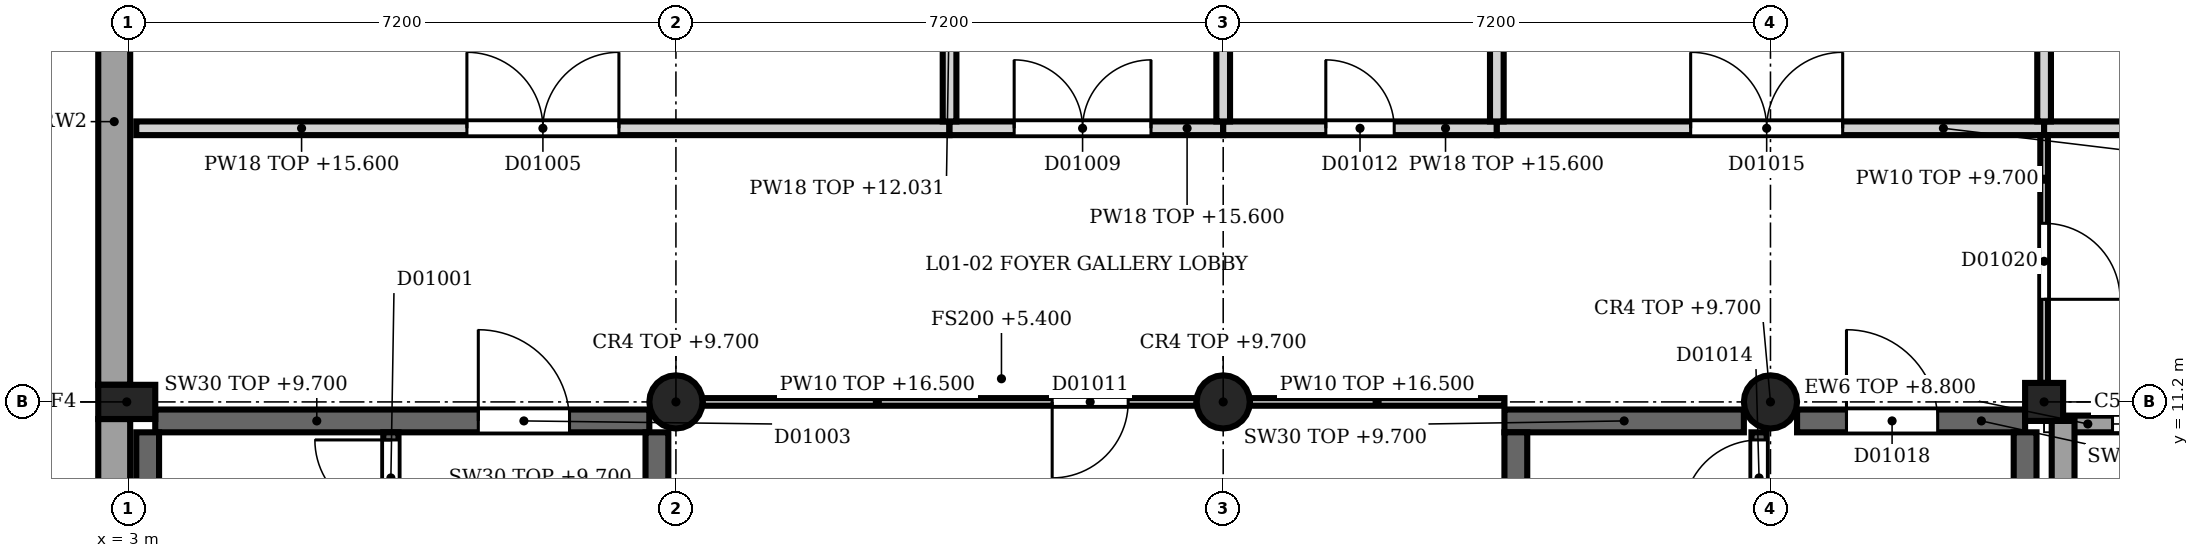
"""IFC4 building model, lengths in metres.
Left out: names, types, materials, properties, quantities, classifications, styles, units other than length and angle.
Written with IfcOpenShell. Run it as: python <this file> out.ifc"""

import sys

from ifc_helpers import new_model, si_unit, direction, frame, frame_2d, origin, origin_2d, place, context, subcontext, project, spatial, rectangle, circle, extrude, element, fill, save


model = new_model("IFC4")
c1 = context("Model", 3, precision=1e-05, world=origin(), true_north=direction((0.0, 1.0)))
c2 = subcontext(c1, "Body", "Model", "MODEL_VIEW")
j1 = project(units=[si_unit("LENGTHUNIT", "METRE"), si_unit("PLANEANGLEUNIT", "RADIAN")], contexts=[c1])
p1 = place(None, origin())
s1 = spatial("IfcSite", under=j1, at=p1, CompositionType="ELEMENT")
p2 = place(p1, origin())
s2 = spatial("IfcBuilding", under=s1, at=p2, CompositionType="ELEMENT")
p3 = place(p2, frame((0.0, 0.0, 5.4)))
s3 = spatial("IfcBuildingStorey", under=s2, at=p3, CompositionType="ELEMENT", Elevation=5.4)
p4 = place(p3, frame((28.2, 11.2, 0.0), z_axis=(0.0, 0.0, 1.0), x_axis=(1.0, 0.0, 0.0)))
e1 = element("IfcColumn", 1, at=p4, inside=s3, PredefinedType="COLUMN", context=c2, shape_type="SweptSolid", body=[
    extrude(rectangle(XDim=0.5, YDim=0.5, at=origin_2d()), origin(), (0.0, 0.0, 1.0), 4.5),
])
p5 = place(p3, frame((2.975, 11.2, 0.0), z_axis=(0.0, 0.0, 1.0), x_axis=(1.0, 0.0, 0.0)))
e2 = element("IfcColumn", 2, at=p5, inside=s3, PredefinedType="COLUMN", context=c2, shape_type="SweptSolid", body=[
    extrude(rectangle(XDim=0.75, YDim=0.45, at=origin_2d()), origin(), (0.0, 0.0, 1.0), 4.5),
])
for number, where, z_axis, x_axis in (
    (3, (10.2, 11.2, 0.0), (0.0, 0.0, 1.0), (1.0, 0.0, 0.0)),
    (4, (17.4, 11.2, 0.0), (0.0, 0.0, 1.0), (1.0, 0.0, 0.0)),
    (5, (24.6, 11.2, 0.0), (0.0, 0.0, 1.0), (1.0, 0.0, 0.0)),
):
    element("IfcColumn", number, at=place(p3, frame(where, z_axis=z_axis, x_axis=x_axis)), inside=s3, PredefinedType="COLUMN", context=c2, shape_type="SweptSolid", body=[
        extrude(circle(Radius=0.35, at=origin_2d()), origin(), (0.0, 0.0, 1.0), 4.3),
    ])
p6 = place(p3, frame((28.45, 10.95, 0.0), z_axis=(0.0, 0.0, 1.0), x_axis=(0.0, -1.0, 0.0)))
e6 = element("IfcWall", 6, at=p6, inside=s3, PredefinedType="SOLIDWALL", context=c2, shape_type="SweptSolid", body=[
    extrude(rectangle(XDim=6.95, YDim=0.3, at=frame_2d((3.475, 0.0))), origin(), (0.0, 0.0, 1.0), 4.5),
])
p7 = place(p3, frame((2.81, 4.0, 0.0), z_axis=(0.0, 0.0, 1.0), x_axis=(0.0, 1.0, 0.0)))
e7 = element("IfcWall", 7, at=p7, inside=s3, PredefinedType="SOLIDWALL", context=c2, shape_type="SweptSolid", body=[
    extrude(rectangle(XDim=6.975, YDim=0.42, at=frame_2d((3.488, 0.0))), origin(), (0.0, 0.0, 1.0), 4.5),
])
p8 = place(p3, frame((2.81, 11.425, 0.0), z_axis=(0.0, 0.0, 1.0), x_axis=(0.0, 1.0, 0.0)))
e8 = element("IfcWall", 8, at=p8, inside=s3, PredefinedType="SOLIDWALL", context=c2, shape_type="SweptSolid", body=[
    extrude(rectangle(XDim=6.925, YDim=0.42, at=frame_2d((3.462, 0.0))), origin(), (0.0, 0.0, 1.0), 4.5),
])
p9 = place(p3, frame((31.55, 10.91, 0.0), z_axis=(0.0, 0.0, 1.0), x_axis=(-1.0, 0.0, 0.0)))
e9 = element("IfcWall", 9, at=p9, inside=s3, PredefinedType="SOLIDWALL", context=c2, shape_type="SweptSolid", body=[
    extrude(rectangle(XDim=3.1, YDim=0.22, at=frame_2d((1.55, 0.0))), origin(), (0.0, 0.0, 1.0), 3.4),
])
p10 = place(p9, frame((0.65, 0.0, 0.9)))
e10 = element("IfcOpeningElement", 10, at=p10, cuts=e9, PredefinedType="OPENING", context=c2, shape_type="SweptSolid", body=[
    extrude(rectangle(XDim=1.8, YDim=2.4, at=frame_2d((0.9, 1.2))), frame((0.0, 0.12, 0.0), z_axis=(0.0, -1.0, 0.0), x_axis=(1.0, 0.0, 0.0)), (0.0, 0.0, 1.0), 0.24),
])
p11 = place(p3, frame((9.85, 10.95, 0.0), z_axis=(0.0, 0.0, 1.0), x_axis=(-1.0, 0.0, 0.0)))
e11 = element("IfcWall", 11, at=p11, inside=s3, PredefinedType="SHEAR", context=c2, shape_type="SweptSolid", body=[
    extrude(rectangle(XDim=6.5, YDim=0.3, at=frame_2d((3.25, 0.0))), origin(), (0.0, 0.0, 1.0), 4.3),
])
p12 = place(p11, frame((1.05, 0.0, 0.0)))
e12 = element("IfcOpeningElement", 12, at=p12, cuts=e11, PredefinedType="OPENING", context=c2, shape_type="SweptSolid", body=[
    extrude(rectangle(XDim=1.2, YDim=2.1, at=frame_2d((0.6, 1.05))), frame((0.0, 0.16, 0.0), z_axis=(0.0, -1.0, 0.0), x_axis=(1.0, 0.0, 0.0)), (0.0, 0.0, 1.0), 0.32),
])
for number, where, z_axis, x_axis in (
    (13, (3.25, 4.4, 0.0), (0.0, 0.0, 1.0), (0.0, 1.0, 0.0)),
    (14, (9.95, 4.4, 0.0), (0.0, 0.0, 1.0), (0.0, 1.0, 0.0)),
):
    element("IfcWall", number, at=place(p3, frame(where, z_axis=z_axis, x_axis=x_axis)), inside=s3, PredefinedType="SHEAR", context=c2, shape_type="SweptSolid", body=[
        extrude(rectangle(XDim=6.4, YDim=0.3, at=frame_2d((3.2, 0.0))), origin(), (0.0, 0.0, 1.0), 4.3),
    ])
p13 = place(p3, frame((6.45, 4.4, 0.0), z_axis=(0.0, 0.0, 1.0), x_axis=(0.0, 1.0, 0.0)))
e15 = element("IfcWall", 15, at=p13, inside=s3, PredefinedType="SHEAR", context=c2, shape_type="SweptSolid", body=[
    extrude(rectangle(XDim=6.4, YDim=0.2, at=frame_2d((3.2, 0.0))), origin(), (0.0, 0.0, 1.0), 4.3),
])
p14 = place(p13, frame((5.3, 0.0, 0.0)))
e16 = element("IfcOpeningElement", 16, at=p14, cuts=e15, PredefinedType="OPENING", context=c2, shape_type="SweptSolid", body=[
    extrude(rectangle(XDim=1.0, YDim=2.1, at=frame_2d((0.5, 1.05))), frame((0.0, 0.11, 0.0), z_axis=(0.0, -1.0, 0.0), x_axis=(1.0, 0.0, 0.0)), (0.0, 0.0, 1.0), 0.22),
])
p15 = place(p3, frame((24.25, 10.95, 0.0), z_axis=(0.0, 0.0, 1.0), x_axis=(-1.0, 0.0, 0.0)))
e17 = element("IfcWall", 17, at=p15, inside=s3, PredefinedType="SHEAR", context=c2, shape_type="SweptSolid", body=[
    extrude(rectangle(XDim=3.15, YDim=0.3, at=frame_2d((1.575, 0.0))), origin(), (0.0, 0.0, 1.0), 4.3),
])
p16 = place(p3, frame((27.95, 10.95, 0.0), z_axis=(0.0, 0.0, 1.0), x_axis=(-1.0, 0.0, 0.0)))
e18 = element("IfcWall", 18, at=p16, inside=s3, PredefinedType="SHEAR", context=c2, shape_type="SweptSolid", body=[
    extrude(rectangle(XDim=3.0, YDim=0.3, at=frame_2d((1.5, 0.0))), origin(), (0.0, 0.0, 1.0), 4.3),
])
p17 = place(p16, frame((1.15, 0.0, 0.0)))
e19 = element("IfcOpeningElement", 19, at=p17, cuts=e18, PredefinedType="OPENING", context=c2, shape_type="SweptSolid", body=[
    extrude(rectangle(XDim=1.2, YDim=2.1, at=frame_2d((0.6, 1.05))), frame((0.0, 0.16, 0.0), z_axis=(0.0, -1.0, 0.0), x_axis=(1.0, 0.0, 0.0)), (0.0, 0.0, 1.0), 0.32),
])
for number, where, z_axis, x_axis in (
    (20, (21.25, 4.4, 0.0), (0.0, 0.0, 1.0), (0.0, 1.0, 0.0)),
    (21, (27.95, 4.4, 0.0), (0.0, 0.0, 1.0), (0.0, 1.0, 0.0)),
):
    element("IfcWall", number, at=place(p3, frame(where, z_axis=z_axis, x_axis=x_axis)), inside=s3, PredefinedType="SHEAR", context=c2, shape_type="SweptSolid", body=[
        extrude(rectangle(XDim=6.4, YDim=0.3, at=frame_2d((3.2, 0.0))), origin(), (0.0, 0.0, 1.0), 4.3),
    ])
p18 = place(p3, frame((24.45, 4.4, 0.0), z_axis=(0.0, 0.0, 1.0), x_axis=(0.0, 1.0, 0.0)))
e22 = element("IfcWall", 22, at=p18, inside=s3, PredefinedType="SHEAR", context=c2, shape_type="SweptSolid", body=[
    extrude(rectangle(XDim=6.4, YDim=0.2, at=frame_2d((3.2, 0.0))), origin(), (0.0, 0.0, 1.0), 4.3),
])
p19 = place(p18, frame((5.3, 0.0, 0.0)))
e23 = element("IfcOpeningElement", 23, at=p19, cuts=e22, PredefinedType="OPENING", context=c2, shape_type="SweptSolid", body=[
    extrude(rectangle(XDim=1.0, YDim=2.1, at=frame_2d((0.5, 1.05))), frame((0.0, 0.11, 0.0), z_axis=(0.0, -1.0, 0.0), x_axis=(1.0, 0.0, 0.0)), (0.0, 0.0, 1.0), 0.22),
])
p20 = place(p3, frame((17.05, 11.2, 0.0), z_axis=(0.0, 0.0, 1.0), x_axis=(-1.0, 0.0, 0.0)))
e24 = element("IfcWall", 24, at=p20, inside=s3, PredefinedType="PARTITIONING", context=c2, shape_type="SweptSolid", body=[
    extrude(rectangle(XDim=6.5, YDim=0.1, at=frame_2d((3.25, 0.0))), origin(), (0.0, 0.0, 1.0), 11.1),
])
p21 = place(p20, frame((0.9, 0.0, 0.0)))
e25 = element("IfcOpeningElement", 25, at=p21, cuts=e24, PredefinedType="OPENING", context=c2, shape_type="SweptSolid", body=[
    extrude(rectangle(XDim=1.0, YDim=2.1, at=frame_2d((0.5, 1.05))), frame((0.0, 0.06, 0.0), z_axis=(0.0, -1.0, 0.0), x_axis=(1.0, 0.0, 0.0)), (0.0, 0.0, 1.0), 0.12),
])
p22 = place(p3, frame((17.75, 11.2, 0.0), z_axis=(0.0, 0.0, 1.0), x_axis=(1.0, 0.0, 0.0)))
e26 = element("IfcWall", 26, at=p22, inside=s3, PredefinedType="PARTITIONING", context=c2, shape_type="SweptSolid", body=[
    extrude(rectangle(XDim=3.35, YDim=0.1, at=frame_2d((1.675, 0.0))), origin(), (0.0, 0.0, 1.0), 11.1),
])
p23 = place(p3, frame((13.8, 14.8, 0.0), z_axis=(0.0, 0.0, 1.0), x_axis=(-1.0, 0.0, 0.0)))
e27 = element("IfcWall", 27, at=p23, inside=s3, PredefinedType="PARTITIONING", context=c2, shape_type="SweptSolid", body=[
    extrude(rectangle(XDim=10.7, YDim=0.18, at=frame_2d((5.35, 0.0))), origin(), (0.0, 0.0, 1.0), 10.2),
])
p24 = place(p23, frame((4.35, 0.0, 0.0)))
e28 = element("IfcOpeningElement", 28, at=p24, cuts=e27, PredefinedType="OPENING", context=c2, shape_type="SweptSolid", body=[
    extrude(rectangle(XDim=2.0, YDim=2.3, at=frame_2d((1.0, 1.15))), frame((0.0, 0.1, 0.0), z_axis=(0.0, -1.0, 0.0), x_axis=(1.0, 0.0, 0.0)), (0.0, 0.0, 1.0), 0.2),
])
p25 = place(p3, frame((13.8, 14.8, 0.0), z_axis=(0.0, 0.0, 1.0), x_axis=(1.0, 0.0, 0.0)))
e29 = element("IfcWall", 29, at=p25, inside=s3, PredefinedType="PARTITIONING", context=c2, shape_type="SweptSolid", body=[
    extrude(rectangle(XDim=3.6, YDim=0.18, at=frame_2d((1.8, 0.0))), origin(), (0.0, 0.0, 1.0), 10.2),
])
p26 = place(p25, frame((0.85, 0.0, 0.0)))
e30 = element("IfcOpeningElement", 30, at=p26, cuts=e29, PredefinedType="OPENING", context=c2, shape_type="SweptSolid", body=[
    extrude(rectangle(XDim=1.8, YDim=2.2, at=frame_2d((0.9, 1.1))), frame((0.0, 0.1, 0.0), z_axis=(0.0, -1.0, 0.0), x_axis=(1.0, 0.0, 0.0)), (0.0, 0.0, 1.0), 0.2),
])
p27 = place(p3, frame((17.4, 14.8, 0.0), z_axis=(0.0, 0.0, 1.0), x_axis=(1.0, 0.0, 0.0)))
e31 = element("IfcWall", 31, at=p27, inside=s3, PredefinedType="PARTITIONING", context=c2, shape_type="SweptSolid", body=[
    extrude(rectangle(XDim=3.6, YDim=0.18, at=frame_2d((1.8, 0.0))), origin(), (0.0, 0.0, 1.0), 10.2),
])
p28 = place(p27, frame((1.35, 0.0, 0.0)))
e32 = element("IfcOpeningElement", 32, at=p28, cuts=e31, PredefinedType="OPENING", context=c2, shape_type="SweptSolid", body=[
    extrude(rectangle(XDim=0.9, YDim=2.2, at=frame_2d((0.45, 1.1))), frame((0.0, 0.1, 0.0), z_axis=(0.0, -1.0, 0.0), x_axis=(1.0, 0.0, 0.0)), (0.0, 0.0, 1.0), 0.2),
])
p29 = place(p3, frame((28.2, 14.8, 0.0), z_axis=(0.0, 0.0, 1.0), x_axis=(-1.0, 0.0, 0.0)))
e33 = element("IfcWall", 33, at=p29, inside=s3, PredefinedType="PARTITIONING", context=c2, shape_type="SweptSolid", body=[
    extrude(rectangle(XDim=7.2, YDim=0.18, at=frame_2d((3.6, 0.0))), origin(), (0.0, 0.0, 1.0), 10.2),
])
p30 = place(p29, frame((2.65, 0.0, 0.0)))
e34 = element("IfcOpeningElement", 34, at=p30, cuts=e33, PredefinedType="OPENING", context=c2, shape_type="SweptSolid", body=[
    extrude(rectangle(XDim=2.0, YDim=2.3, at=frame_2d((1.0, 1.15))), frame((0.0, 0.1, 0.0), z_axis=(0.0, -1.0, 0.0), x_axis=(1.0, 0.0, 0.0)), (0.0, 0.0, 1.0), 0.2),
])
p31 = place(p3, frame((28.2, 14.8, 0.0), z_axis=(0.0, 0.0, 1.0), x_axis=(1.0, 0.0, 0.0)))
e35 = element("IfcWall", 35, at=p31, inside=s3, PredefinedType="PARTITIONING", context=c2, shape_type="SweptSolid", body=[
    extrude(rectangle(XDim=7.2, YDim=0.18, at=frame_2d((3.6, 0.0))), origin(), (0.0, 0.0, 1.0), 4.3),
])
p32 = place(p3, frame((13.8, 14.89, 0.0), z_axis=(0.0, 0.0, 1.0), x_axis=(0.0, 1.0, 0.0)))
e36 = element("IfcWall", 36, at=p32, inside=s3, PredefinedType="PARTITIONING", context=c2, shape_type="SweptSolid", body=[
    extrude(rectangle(XDim=3.41, YDim=0.18, at=frame_2d((1.705, 0.0))), origin(), (0.0, 0.0, 1.0), 6.631),
])
p33 = place(p3, frame((17.4, 14.89, 0.0), z_axis=(0.0, 0.0, 1.0), x_axis=(0.0, 1.0, 0.0)))
e37 = element("IfcWall", 37, at=p33, inside=s3, PredefinedType="PARTITIONING", context=c2, shape_type="SweptSolid", body=[
    extrude(rectangle(XDim=3.16, YDim=0.18, at=frame_2d((1.58, 0.0))), origin(), (0.0, 0.0, 1.0), 4.426),
])
p34 = place(p3, frame((21.0, 14.89, 0.0), z_axis=(0.0, 0.0, 1.0), x_axis=(0.0, 1.0, 0.0)))
e38 = element("IfcWall", 38, at=p34, inside=s3, PredefinedType="PARTITIONING", context=c2, shape_type="SweptSolid", body=[
    extrude(rectangle(XDim=3.41, YDim=0.18, at=frame_2d((1.705, 0.0))), origin(), (0.0, 0.0, 1.0), 6.631),
])
p35 = place(p3, frame((28.2, 14.71, 0.0), z_axis=(0.0, 0.0, 1.0), x_axis=(0.0, -1.0, 0.0)))
e39 = element("IfcWall", 39, at=p35, inside=s3, PredefinedType="PARTITIONING", context=c2, shape_type="SweptSolid", body=[
    extrude(rectangle(XDim=3.26, YDim=0.1, at=frame_2d((1.63, 0.0))), origin(), (0.0, 0.0, 1.0), 4.3),
])
p36 = place(p35, frame((1.16, 0.0, 0.0)))
e40 = element("IfcOpeningElement", 40, at=p36, cuts=e39, PredefinedType="OPENING", context=c2, shape_type="SweptSolid", body=[
    extrude(rectangle(XDim=1.0, YDim=2.1, at=frame_2d((0.5, 1.05))), frame((0.0, 0.06, 0.0), z_axis=(0.0, -1.0, 0.0), x_axis=(1.0, 0.0, 0.0)), (0.0, 0.0, 1.0), 0.12),
])
p37 = place(p3, frame((28.2, 14.89, 0.0), z_axis=(0.0, 0.0, 1.0), x_axis=(0.0, 1.0, 0.0)))
e41 = element("IfcWall", 41, at=p37, inside=s3, PredefinedType="PARTITIONING", context=c2, shape_type="SweptSolid", body=[
    extrude(rectangle(XDim=3.26, YDim=0.18, at=frame_2d((1.63, 0.0))), origin(), (0.0, 0.0, 1.0), 4.3),
])
p38 = place(p10, origin())
e42 = element("IfcWindow", 42, at=p38, inside=s3, PartitioningType="SINGLE_PANEL", PredefinedType="WINDOW", context=c2, shape_type="SweptSolid", body=[
    extrude(rectangle(XDim=1.8, YDim=2.4, at=frame_2d((0.9, 1.2))), frame((0.0, 0.03, 0.0), z_axis=(0.0, -1.0, 0.0), x_axis=(1.0, 0.0, 0.0)), (0.0, 0.0, 1.0), 0.06),
])
fill(e10, e42)
p39 = place(p12, origin())
e43 = element("IfcDoor", 43, at=p39, inside=s3, OperationType="SINGLE_SWING_LEFT", PredefinedType="DOOR", context=c2, shape_type="SweptSolid", body=[
    extrude(rectangle(XDim=1.2, YDim=2.1, at=frame_2d((0.6, 1.05))), frame((0.0, 0.025, 0.0), z_axis=(0.0, -1.0, 0.0), x_axis=(1.0, 0.0, 0.0)), (0.0, 0.0, 1.0), 0.05),
])
fill(e12, e43)
p40 = place(p14, origin())
e44 = element("IfcDoor", 44, at=p40, inside=s3, OperationType="SINGLE_SWING_RIGHT", PredefinedType="DOOR", context=c2, shape_type="SweptSolid", body=[
    extrude(rectangle(XDim=1.0, YDim=2.1, at=frame_2d((0.5, 1.05))), frame((0.0, 0.025, 0.0), z_axis=(0.0, -1.0, 0.0), x_axis=(1.0, 0.0, 0.0)), (0.0, 0.0, 1.0), 0.05),
])
fill(e16, e44)
p41 = place(p17, origin())
e45 = element("IfcDoor", 45, at=p41, inside=s3, OperationType="SINGLE_SWING_RIGHT", PredefinedType="DOOR", context=c2, shape_type="SweptSolid", body=[
    extrude(rectangle(XDim=1.2, YDim=2.1, at=frame_2d((0.6, 1.05))), frame((0.0, 0.025, 0.0), z_axis=(0.0, -1.0, 0.0), x_axis=(1.0, 0.0, 0.0)), (0.0, 0.0, 1.0), 0.05),
])
fill(e19, e45)
p42 = place(p19, origin())
e46 = element("IfcDoor", 46, at=p42, inside=s3, OperationType="SINGLE_SWING_RIGHT", PredefinedType="DOOR", context=c2, shape_type="SweptSolid", body=[
    extrude(rectangle(XDim=1.0, YDim=2.1, at=frame_2d((0.5, 1.05))), frame((0.0, 0.025, 0.0), z_axis=(0.0, -1.0, 0.0), x_axis=(1.0, 0.0, 0.0)), (0.0, 0.0, 1.0), 0.05),
])
fill(e23, e46)
p43 = place(p21, origin())
e47 = element("IfcDoor", 47, at=p43, inside=s3, OperationType="SINGLE_SWING_LEFT", PredefinedType="DOOR", context=c2, shape_type="SweptSolid", body=[
    extrude(rectangle(XDim=1.0, YDim=2.1, at=frame_2d((0.5, 1.05))), frame((0.0, 0.025, 0.0), z_axis=(0.0, -1.0, 0.0), x_axis=(1.0, 0.0, 0.0)), (0.0, 0.0, 1.0), 0.05),
])
fill(e25, e47)
p44 = place(p24, origin())
e48 = element("IfcDoor", 48, at=p44, inside=s3, OperationType="SINGLE_SWING_LEFT", PredefinedType="DOOR", context=c2, shape_type="SweptSolid", body=[
    extrude(rectangle(XDim=2.0, YDim=2.3, at=frame_2d((1.0, 1.15))), frame((0.0, 0.025, 0.0), z_axis=(0.0, -1.0, 0.0), x_axis=(1.0, 0.0, 0.0)), (0.0, 0.0, 1.0), 0.05),
])
fill(e28, e48)
p45 = place(p26, origin())
e49 = element("IfcDoor", 49, at=p45, inside=s3, OperationType="SINGLE_SWING_LEFT", PredefinedType="DOOR", context=c2, shape_type="SweptSolid", body=[
    extrude(rectangle(XDim=1.8, YDim=2.2, at=frame_2d((0.9, 1.1))), frame((0.0, 0.025, 0.0), z_axis=(0.0, -1.0, 0.0), x_axis=(1.0, 0.0, 0.0)), (0.0, 0.0, 1.0), 0.05),
])
fill(e30, e49)
p46 = place(p28, origin())
e50 = element("IfcDoor", 50, at=p46, inside=s3, OperationType="SINGLE_SWING_LEFT", PredefinedType="DOOR", context=c2, shape_type="SweptSolid", body=[
    extrude(rectangle(XDim=0.9, YDim=2.2, at=frame_2d((0.45, 1.1))), frame((0.0, 0.025, 0.0), z_axis=(0.0, -1.0, 0.0), x_axis=(1.0, 0.0, 0.0)), (0.0, 0.0, 1.0), 0.05),
])
fill(e32, e50)
p47 = place(p30, origin())
e51 = element("IfcDoor", 51, at=p47, inside=s3, OperationType="SINGLE_SWING_LEFT", PredefinedType="DOOR", context=c2, shape_type="SweptSolid", body=[
    extrude(rectangle(XDim=2.0, YDim=2.3, at=frame_2d((1.0, 1.15))), frame((0.0, 0.025, 0.0), z_axis=(0.0, -1.0, 0.0), x_axis=(1.0, 0.0, 0.0)), (0.0, 0.0, 1.0), 0.05),
])
fill(e34, e51)
p48 = place(p36, origin())
e52 = element("IfcDoor", 52, at=p48, inside=s3, OperationType="SINGLE_SWING_RIGHT", PredefinedType="DOOR", context=c2, shape_type="SweptSolid", body=[
    extrude(rectangle(XDim=1.0, YDim=2.1, at=frame_2d((0.5, 1.05))), frame((0.0, 0.025, 0.0), z_axis=(0.0, -1.0, 0.0), x_axis=(1.0, 0.0, 0.0)), (0.0, 0.0, 1.0), 0.05),
])
fill(e40, e52)
save(model, sys.argv[1])
